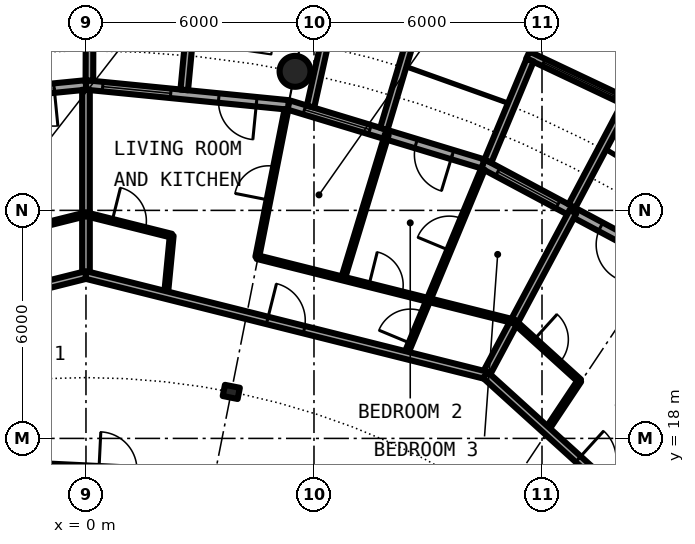
"""IFC4 building model, lengths in metres.
Left out: names, types, materials, properties, quantities, classifications, styles, units other than length and angle.
Written with IfcOpenShell. Run it as: python <this file> out.ifc"""

import sys

from ifc_helpers import new_model, si_unit, direction, frame, frame_2d, origin, origin_2d, place, context, subcontext, project, spatial, rectangle, circle, hollow_circle, i_section, extrude, element, fill, save


model = new_model("IFC4")
c1 = context("Model", 3, precision=1e-05, world=origin(), true_north=direction((0.0, 1.0)))
c2 = subcontext(c1, "Body", "Model", "MODEL_VIEW")
j1 = project(units=[si_unit("LENGTHUNIT", "METRE"), si_unit("PLANEANGLEUNIT", "RADIAN")], contexts=[c1])
p1 = place(None, origin())
s1 = spatial("IfcSite", under=j1, at=p1, CompositionType="ELEMENT")
p2 = place(p1, origin())
s2 = spatial("IfcBuilding", under=s1, at=p2, CompositionType="ELEMENT")
p3 = place(p2, frame((0.0, 0.0, 190.2)))
s3 = spatial("IfcBuildingStorey", under=s2, at=p3, CompositionType="ELEMENT", Elevation=190.2)
p4 = place(p3, frame((5.501, 27.658, 0.0), z_axis=(0.0, 0.0, 1.0), x_axis=(1.0, 0.0, 0.0)))
e1 = element("IfcColumn", 1, at=p4, inside=s3, PredefinedType="COLUMN", context=c2, shape_type="SweptSolid", body=[
    extrude(hollow_circle(Radius=0.406, WallThickness=0.03, at=origin_2d()), origin(), (0.0, 0.0, 1.0), 3.05),
])
p5 = place(p3, frame((3.824, 19.223, 0.0), z_axis=(0.0, 0.0, 1.0), x_axis=(0.195090322016, 0.980785280403, 0.0)))
e2 = element("IfcColumn", 2, at=p5, inside=s3, PredefinedType="COLUMN", context=c2, shape_type="SweptSolid", body=[
    extrude(i_section(OverallWidth=0.3, OverallDepth=0.4, WebThickness=0.013, FlangeThickness=0.024, FilletRadius=0.027, at=origin_2d()), origin(), (0.0, 0.0, 1.0), 3.05),
])
p6 = place(p3, frame((15.167, 22.699, 0.0), z_axis=(0.0, 0.0, 1.0), x_axis=(-0.881915646801, 0.471407246368, 0.0)))
e3 = element("IfcWall", 3, at=p6, inside=s3, PredefinedType="SOLIDWALL", context=c2, shape_type="SweptSolid", body=[
    extrude(rectangle(XDim=5.352, YDim=0.25, at=frame_2d((2.676, 0.0))), origin(), (0.0, 0.0, 1.0), 2.7),
])
p7 = place(p6, frame((0.841, 0.0, 0.0)))
e4 = element("IfcOpeningElement", 4, at=p7, cuts=e3, PredefinedType="OPENING", context=c2, shape_type="SweptSolid", body=[
    extrude(rectangle(XDim=1.0, YDim=2.2, at=frame_2d((0.5, 1.1))), frame((0.0, 0.135, 0.0), z_axis=(0.0, -1.0, 0.0), x_axis=(1.0, 0.0, 0.0)), (0.0, 0.0, 1.0), 0.27),
])
p8 = place(p6, frame((3.111, 0.0, 0.3)))
e5 = element("IfcOpeningElement", 5, at=p8, cuts=e3, PredefinedType="OPENING", context=c2, shape_type="SweptSolid", body=[
    extrude(rectangle(XDim=1.8, YDim=2.1, at=frame_2d((0.9, 1.05))), frame((0.0, 0.135, 0.0), z_axis=(0.0, -1.0, 0.0), x_axis=(1.0, 0.0, 0.0)), (0.0, 0.0, 1.0), 0.27),
])
p9 = place(p3, frame((14.335, 26.808, -0.03), z_axis=(0.0, 0.0, 1.0), x_axis=(-0.904000060331, 0.427532327342, 0.0)))
e6 = element("IfcWall", 6, at=p9, inside=s3, PredefinedType="SOLIDWALL", context=c2, shape_type="SweptSolid", body=[
    extrude(rectangle(XDim=2.993, YDim=0.2, at=frame_2d((1.497, 0.0))), origin(), (0.0, 0.0, 1.0), 2.73),
])
p10 = place(p9, frame((0.457, 0.0, 0.33)))
e7 = element("IfcOpeningElement", 7, at=p10, cuts=e6, PredefinedType="OPENING", context=c2, shape_type="SweptSolid", body=[
    extrude(circle(Radius=1.04, at=frame_2d((1.04, 1.04))), frame((0.0, 0.11, 0.0), z_axis=(0.0, -1.0, 0.0), x_axis=(1.0, 0.0, 0.0)), (0.0, 0.0, 1.0), 0.22),
])
p11 = place(p3, frame((12.787, 24.113, -0.03), z_axis=(0.0, 0.0, 1.0), x_axis=(0.468365282436, 0.883534924159, 0.0)))
e8 = element("IfcWall", 8, at=p11, inside=s3, PredefinedType="SOLIDWALL", context=c2, shape_type="SweptSolid", body=[
    extrude(rectangle(XDim=3.006, YDim=0.2, at=frame_2d((1.503, 0.0))), origin(), (0.0, 0.0, 1.0), 2.73),
])
p12 = place(p3, frame((10.575, 25.295, -0.03), z_axis=(0.0, 0.0, 1.0), x_axis=(0.385697364644, 0.922625353492, 0.0)))
e9 = element("IfcWall", 9, at=p12, inside=s3, PredefinedType="SOLIDWALL", context=c2, shape_type="SweptSolid", body=[
    extrude(rectangle(XDim=2.883, YDim=0.2, at=frame_2d((1.442, 0.0))), origin(), (0.0, 0.0, 1.0), 2.73),
])
p13 = place(p3, frame((10.447, 25.222, 0.0), z_axis=(0.0, 0.0, 1.0), x_axis=(-0.956965678721, 0.290201119486, 0.0)))
e10 = element("IfcWall", 10, at=p13, inside=s3, PredefinedType="SOLIDWALL", context=c2, shape_type="SweptSolid", body=[
    extrude(rectangle(XDim=5.351, YDim=0.25, at=frame_2d((2.676, 0.0))), origin(), (0.0, 0.0, 1.0), 2.7),
])
p14 = place(p13, frame((0.841, 0.0, 0.0)))
e11 = element("IfcOpeningElement", 11, at=p14, cuts=e10, PredefinedType="OPENING", context=c2, shape_type="SweptSolid", body=[
    extrude(rectangle(XDim=1.0, YDim=2.2, at=frame_2d((0.5, 1.1))), frame((0.0, 0.135, 0.0), z_axis=(0.0, -1.0, 0.0), x_axis=(1.0, 0.0, 0.0)), (0.0, 0.0, 1.0), 0.27),
])
p15 = place(p13, frame((3.111, 0.0, 0.3)))
e12 = element("IfcOpeningElement", 12, at=p15, cuts=e10, PredefinedType="OPENING", context=c2, shape_type="SweptSolid", body=[
    extrude(rectangle(XDim=1.8, YDim=2.1, at=frame_2d((0.9, 1.05))), frame((0.0, 0.135, 0.0), z_axis=(0.0, -1.0, 0.0), x_axis=(1.0, 0.0, 0.0)), (0.0, 0.0, 1.0), 0.27),
])
p16 = place(p3, frame((7.837, 26.144, -0.03), z_axis=(0.0, 0.0, 1.0), x_axis=(0.287064767992, 0.957911174889, 0.0)))
e13 = element("IfcWall", 13, at=p16, inside=s3, PredefinedType="SOLIDWALL", context=c2, shape_type="SweptSolid", body=[
    extrude(rectangle(XDim=3.006, YDim=0.2, at=frame_2d((1.503, 0.0))), origin(), (0.0, 0.0, 1.0), 2.73),
])
p17 = place(p3, frame((5.909, 26.729, -0.03), z_axis=(0.0, 0.0, 1.0), x_axis=(0.216409053917, 0.976302781612, 0.0)))
e14 = element("IfcWall", 14, at=p17, inside=s3, PredefinedType="SOLIDWALL", context=c2, shape_type="SweptSolid", body=[
    extrude(rectangle(XDim=2.925, YDim=0.2, at=frame_2d((1.463, 0.0))), origin(), (0.0, 0.0, 1.0), 2.73),
])
p18 = place(p3, frame((5.326, 26.775, 0.0), z_axis=(0.0, 0.0, 1.0), x_axis=(-0.995173996315, 0.098126026407, 0.0)))
e15 = element("IfcWall", 15, at=p18, inside=s3, PredefinedType="SOLIDWALL", context=c2, shape_type="SweptSolid", body=[
    extrude(rectangle(XDim=5.352, YDim=0.25, at=frame_2d((2.676, 0.0))), origin(), (0.0, 0.0, 1.0), 2.7),
])
p19 = place(p18, frame((0.841, 0.0, 0.0)))
e16 = element("IfcOpeningElement", 16, at=p19, cuts=e15, PredefinedType="OPENING", context=c2, shape_type="SweptSolid", body=[
    extrude(rectangle(XDim=1.0, YDim=2.2, at=frame_2d((0.5, 1.1))), frame((0.0, 0.135, 0.0), z_axis=(0.0, -1.0, 0.0), x_axis=(1.0, 0.0, 0.0)), (0.0, 0.0, 1.0), 0.27),
])
p20 = place(p18, frame((3.111, 0.0, 0.3)))
e17 = element("IfcOpeningElement", 17, at=p20, cuts=e15, PredefinedType="OPENING", context=c2, shape_type="SweptSolid", body=[
    extrude(rectangle(XDim=1.8, YDim=2.1, at=frame_2d((0.9, 1.05))), frame((0.0, 0.135, 0.0), z_axis=(0.0, -1.0, 0.0), x_axis=(1.0, 0.0, 0.0)), (0.0, 0.0, 1.0), 0.27),
])
p21 = place(p3, frame((2.586, 27.171, -0.03), z_axis=(0.0, 0.0, 1.0), x_axis=(0.094548432284, 0.995520262954, 0.0)))
e18 = element("IfcWall", 18, at=p21, inside=s3, PredefinedType="SOLIDWALL", context=c2, shape_type="SweptSolid", body=[
    extrude(rectangle(XDim=3.006, YDim=0.2, at=frame_2d((1.503, 0.0))), origin(), (0.0, 0.0, 1.0), 2.73),
])
p22 = place(p3, frame((0.09, 27.417, -0.03), z_axis=(0.0, 0.0, 1.0), x_axis=(0.00347308367, 0.999993968827, 0.0)))
e19 = element("IfcWall", 19, at=p22, inside=s3, PredefinedType="SOLIDWALL", context=c2, shape_type="SweptSolid", body=[
    extrude(rectangle(XDim=2.882, YDim=0.2, at=frame_2d((1.441, 0.0))), origin(), (0.0, 0.0, 1.0), 2.73),
])
p23 = place(p3, frame((0.0, 27.3, 0.0), z_axis=(0.0, 0.0, 1.0), x_axis=(-0.995173996315, -0.098126026407, 0.0)))
e20 = element("IfcWall", 20, at=p23, inside=s3, PredefinedType="SOLIDWALL", context=c2, shape_type="SweptSolid", body=[
    extrude(rectangle(XDim=5.352, YDim=0.25, at=frame_2d((2.676, 0.0))), origin(), (0.0, 0.0, 1.0), 2.7),
])
p24 = place(p23, frame((0.841, 0.0, 0.0)))
e21 = element("IfcOpeningElement", 21, at=p24, cuts=e20, PredefinedType="OPENING", context=c2, shape_type="SweptSolid", body=[
    extrude(rectangle(XDim=1.0, YDim=2.2, at=frame_2d((0.5, 1.1))), frame((0.0, 0.135, 0.0), z_axis=(0.0, -1.0, 0.0), x_axis=(1.0, 0.0, 0.0)), (0.0, 0.0, 1.0), 0.27),
])
p25 = place(p23, frame((3.111, 0.0, 0.3)))
e22 = element("IfcOpeningElement", 22, at=p25, cuts=e20, PredefinedType="OPENING", context=c2, shape_type="SweptSolid", body=[
    extrude(rectangle(XDim=1.8, YDim=2.1, at=frame_2d((0.9, 1.05))), frame((0.0, 0.135, 0.0), z_axis=(0.0, -1.0, 0.0), x_axis=(1.0, 0.0, 0.0)), (0.0, 0.0, 1.0), 0.27),
])
p26 = place(p3, frame((8.41, 20.193, 0.0), z_axis=(0.0, 0.0, 1.0), x_axis=(0.38420646001, 0.923247202046, 0.0)))
e23 = element("IfcWall", 23, at=p26, inside=s3, PredefinedType="PARTITIONING", context=c2, shape_type="SweptSolid", body=[
    extrude(rectangle(XDim=5.3, YDim=0.1, at=frame_2d((2.65, 0.0))), origin(), (0.0, 0.0, 1.0), 2.7),
])
p27 = place(p26, frame((0.335, 0.0, 0.0)))
e24 = element("IfcOpeningElement", 24, at=p27, cuts=e23, PredefinedType="OPENING", context=c2, shape_type="SweptSolid", body=[
    extrude(rectangle(XDim=0.9, YDim=2.3, at=frame_2d((0.45, 1.15))), frame((0.0, 0.06, 0.0), z_axis=(0.0, -1.0, 0.0), x_axis=(1.0, 0.0, 0.0)), (0.0, 0.0, 1.0), 0.12),
])
p28 = place(p26, frame((2.985, 0.0, 0.0)))
e25 = element("IfcOpeningElement", 25, at=p28, cuts=e23, PredefinedType="OPENING", context=c2, shape_type="SweptSolid", body=[
    extrude(rectangle(XDim=0.9, YDim=2.3, at=frame_2d((0.45, 1.15))), frame((0.0, 0.06, 0.0), z_axis=(0.0, -1.0, 0.0), x_axis=(1.0, 0.0, 0.0)), (0.0, 0.0, 1.0), 0.12),
])
p29 = place(p3, frame((0.0, 22.3, 0.0), z_axis=(0.0, 0.0, 1.0), x_axis=(0.0, 1.0, 0.0)))
e26 = element("IfcWall", 26, at=p29, inside=s3, PredefinedType="PARTITIONING", context=c2, shape_type="SweptSolid", body=[
    extrude(rectangle(XDim=4.875, YDim=0.2, at=frame_2d((2.438, 0.0))), origin(), (0.0, 0.0, 1.0), 2.7),
])
p30 = place(p3, frame((2.105, 21.773, 0.0), z_axis=(0.0, 0.0, 1.0), x_axis=(0.096239724492, 0.995358184489, 0.0)))
e27 = element("IfcWall", 27, at=p30, inside=s3, PredefinedType="PARTITIONING", context=c2, shape_type="SweptSolid", body=[
    extrude(rectangle(XDim=1.57, YDim=0.1, at=frame_2d((0.785, 0.0))), origin(), (0.0, 0.0, 1.0), 2.7),
])
p31 = place(p3, frame((4.507, 22.771, 0.0), z_axis=(0.0, 0.0, 1.0), x_axis=(0.194030211642, 0.980995554001, 0.0)))
e28 = element("IfcWall", 28, at=p31, inside=s3, PredefinedType="PARTITIONING", context=c2, shape_type="SweptSolid", body=[
    extrude(rectangle(XDim=3.962, YDim=0.1, at=frame_2d((1.981, 0.0))), origin(), (0.0, 0.0, 1.0), 2.7),
])
p32 = place(p31, frame((1.531, 0.0, 0.0)))
e29 = element("IfcOpeningElement", 29, at=p32, cuts=e28, PredefinedType="OPENING", context=c2, shape_type="SweptSolid", body=[
    extrude(rectangle(XDim=0.9, YDim=2.3, at=frame_2d((0.45, 1.15))), frame((0.0, 0.06, 0.0), z_axis=(0.0, -1.0, 0.0), x_axis=(1.0, 0.0, 0.0)), (0.0, 0.0, 1.0), 0.12),
])
p33 = place(p3, frame((6.763, 22.206, 0.0), z_axis=(0.0, 0.0, 1.0), x_axis=(0.291291575636, 0.956634317785, 0.0)))
e30 = element("IfcWall", 30, at=p33, inside=s3, PredefinedType="PARTITIONING", context=c2, shape_type="SweptSolid", body=[
    extrude(rectangle(XDim=3.962, YDim=0.1, at=frame_2d((1.981, 0.0))), origin(), (0.0, 0.0, 1.0), 2.7),
])
p34 = place(p3, frame((10.516, 19.665, 0.0), z_axis=(0.0, 0.0, 1.0), x_axis=(0.471388689095, 0.881925565903, 0.0)))
e31 = element("IfcWall", 31, at=p34, inside=s3, PredefinedType="PARTITIONING", context=c2, shape_type="SweptSolid", body=[
    extrude(rectangle(XDim=4.875, YDim=0.2, at=frame_2d((2.438, 0.0))), origin(), (0.0, 0.0, 1.0), 2.7),
])
p35 = place(p3, frame((12.118, 18.211, 0.0), z_axis=(0.0, 0.0, 1.0), x_axis=(0.554125989098, 0.832432813028, 0.0)))
e32 = element("IfcWall", 32, at=p35, inside=s3, PredefinedType="PARTITIONING", context=c2, shape_type="SweptSolid", body=[
    extrude(rectangle(XDim=1.57, YDim=0.1, at=frame_2d((0.785, 0.0))), origin(), (0.0, 0.0, 1.0), 2.7),
])
p36 = place(p3, frame((-3.458, 17.359, 0.0), z_axis=(0.0, 0.0, 1.0), x_axis=(0.998807562286, -0.048820625966, 0.0)))
e33 = element("IfcWall", 33, at=p36, inside=s3, PredefinedType="PARTITIONING", context=c2, shape_type="SweptSolid", body=[
    extrude(rectangle(XDim=8.601, YDim=0.2, at=frame_2d((4.301, 0.0))), origin(), (0.0, 0.0, 1.0), 2.7),
])
p37 = place(p36, frame((3.804, 0.0, 0.0)))
e34 = element("IfcOpeningElement", 34, at=p37, cuts=e33, PredefinedType="OPENING", context=c2, shape_type="SweptSolid", body=[
    extrude(rectangle(XDim=1.0, YDim=2.3, at=frame_2d((0.5, 1.15))), frame((0.0, 0.11, 0.0), z_axis=(0.0, -1.0, 0.0), x_axis=(1.0, 0.0, 0.0)), (0.0, 0.0, 1.0), 0.22),
])
p38 = place(p3, frame((-10.521, 19.662, 0.0), z_axis=(0.0, 0.0, 1.0), x_axis=(0.969975443945, 0.243202874456, 0.0)))
e35 = element("IfcWall", 35, at=p38, inside=s3, PredefinedType="PARTITIONING", context=c2, shape_type="SweptSolid", body=[
    extrude(rectangle(XDim=10.847, YDim=0.2, at=frame_2d((5.423, 0.0))), origin(), (0.0, 0.0, 1.0), 2.7),
])
p39 = place(p38, frame((4.928, 0.0, 0.0)))
e36 = element("IfcOpeningElement", 36, at=p39, cuts=e35, PredefinedType="OPENING", context=c2, shape_type="SweptSolid", body=[
    extrude(rectangle(XDim=1.0, YDim=2.3, at=frame_2d((0.5, 1.15))), frame((0.0, 0.11, 0.0), z_axis=(0.0, -1.0, 0.0), x_axis=(1.0, 0.0, 0.0)), (0.0, 0.0, 1.0), 0.22),
])
p40 = place(p3, frame((0.0, 22.3, 0.0), z_axis=(0.0, 0.0, 1.0), x_axis=(0.969975443945, -0.243202874456, 0.0)))
e37 = element("IfcWall", 37, at=p40, inside=s3, PredefinedType="PARTITIONING", context=c2, shape_type="SweptSolid", body=[
    extrude(rectangle(XDim=10.847, YDim=0.2, at=frame_2d((5.423, 0.0))), origin(), (0.0, 0.0, 1.0), 2.7),
])
p41 = place(p40, frame((4.918, 0.0, 0.0)))
e38 = element("IfcOpeningElement", 38, at=p41, cuts=e37, PredefinedType="OPENING", context=c2, shape_type="SweptSolid", body=[
    extrude(rectangle(XDim=1.0, YDim=2.3, at=frame_2d((0.5, 1.15))), frame((0.0, 0.11, 0.0), z_axis=(0.0, -1.0, 0.0), x_axis=(1.0, 0.0, 0.0)), (0.0, 0.0, 1.0), 0.22),
])
p42 = place(p3, frame((10.512, 19.667, 0.0), z_axis=(0.0, 0.0, 1.0), x_axis=(0.740853508928, -0.671666642248, 0.0)))
e39 = element("IfcWall", 39, at=p42, inside=s3, PredefinedType="PARTITIONING", context=c2, shape_type="SweptSolid", body=[
    extrude(rectangle(XDim=10.84, YDim=0.2, at=frame_2d((5.42, 0.0))), origin(), (0.0, 0.0, 1.0), 2.7),
])
p43 = place(p42, frame((3.293, 0.0, 0.0)))
e40 = element("IfcOpeningElement", 40, at=p43, cuts=e39, PredefinedType="OPENING", context=c2, shape_type="SweptSolid", body=[
    extrude(rectangle(XDim=1.0, YDim=2.3, at=frame_2d((0.5, 1.15))), frame((0.0, 0.11, 0.0), z_axis=(0.0, -1.0, 0.0), x_axis=(1.0, 0.0, 0.0)), (0.0, 0.0, 1.0), 0.22),
])
p44 = place(p3, frame((-6.76, 22.206, 0.0), z_axis=(0.0, 0.0, 1.0), x_axis=(0.9700785795, 0.242791164576, 0.0)))
e41 = element("IfcWall", 41, at=p44, inside=s3, PredefinedType="PARTITIONING", context=c2, shape_type="SweptSolid", body=[
    extrude(rectangle(XDim=6.969, YDim=0.1, at=frame_2d((3.484, 0.0))), origin(), (0.0, 0.0, 1.0), 2.7),
])
p45 = place(p44, frame((3.036, 0.0, 0.0)))
e42 = element("IfcOpeningElement", 42, at=p45, cuts=e41, PredefinedType="OPENING", context=c2, shape_type="SweptSolid", body=[
    extrude(rectangle(XDim=0.9, YDim=2.3, at=frame_2d((0.45, 1.15))), frame((0.0, 0.06, 0.0), z_axis=(0.0, -1.0, 0.0), x_axis=(1.0, 0.0, 0.0)), (0.0, 0.0, 1.0), 0.12),
])
p46 = place(p3, frame((0.0, 23.898, 0.0), z_axis=(0.0, 0.0, 1.0), x_axis=(0.970068250789, -0.242832429489, 0.0)))
e43 = element("IfcWall", 43, at=p46, inside=s3, PredefinedType="PARTITIONING", context=c2, shape_type="SweptSolid", body=[
    extrude(rectangle(XDim=2.323, YDim=0.1, at=frame_2d((1.161, 0.0))), origin(), (0.0, 0.0, 1.0), 2.7),
])
p47 = place(p46, frame((0.711, 0.0, 0.0)))
e44 = element("IfcOpeningElement", 44, at=p47, cuts=e43, PredefinedType="OPENING", context=c2, shape_type="SweptSolid", body=[
    extrude(rectangle(XDim=0.9, YDim=2.3, at=frame_2d((0.45, 1.15))), frame((0.0, 0.06, 0.0), z_axis=(0.0, -1.0, 0.0), x_axis=(1.0, 0.0, 0.0)), (0.0, 0.0, 1.0), 0.12),
])
p48 = place(p3, frame((4.502, 22.771, 0.0), z_axis=(0.0, 0.0, 1.0), x_axis=(0.970072433546, -0.242815719578, 0.0)))
e45 = element("IfcWall", 45, at=p48, inside=s3, PredefinedType="PARTITIONING", context=c2, shape_type="SweptSolid", body=[
    extrude(rectangle(XDim=6.973, YDim=0.1, at=frame_2d((3.486, 0.0))), origin(), (0.0, 0.0, 1.0), 2.7),
])
p49 = place(p48, frame((3.036, 0.0, 0.0)))
e46 = element("IfcOpeningElement", 46, at=p49, cuts=e45, PredefinedType="OPENING", context=c2, shape_type="SweptSolid", body=[
    extrude(rectangle(XDim=0.9, YDim=2.3, at=frame_2d((0.45, 1.15))), frame((0.0, 0.06, 0.0), z_axis=(0.0, -1.0, 0.0), x_axis=(1.0, 0.0, 0.0)), (0.0, 0.0, 1.0), 0.12),
])
p50 = place(p3, frame((11.271, 21.074, 0.0), z_axis=(0.0, 0.0, 1.0), x_axis=(0.74087097024, -0.671647381783, 0.0)))
e47 = element("IfcWall", 47, at=p50, inside=s3, PredefinedType="PARTITIONING", context=c2, shape_type="SweptSolid", body=[
    extrude(rectangle(XDim=2.324, YDim=0.1, at=frame_2d((1.162, 0.0))), origin(), (0.0, 0.0, 1.0), 2.7),
])
p51 = place(p50, frame((0.705, 0.0, 0.0)))
e48 = element("IfcOpeningElement", 48, at=p51, cuts=e47, PredefinedType="OPENING", context=c2, shape_type="SweptSolid", body=[
    extrude(rectangle(XDim=0.9, YDim=2.3, at=frame_2d((0.45, 1.15))), frame((0.0, 0.06, 0.0), z_axis=(0.0, -1.0, 0.0), x_axis=(1.0, 0.0, 0.0)), (0.0, 0.0, 1.0), 0.12),
])
p52 = place(p7, origin())
e49 = element("IfcDoor", 49, at=p52, inside=s3, OperationType="SINGLE_SWING_LEFT", PredefinedType="DOOR", context=c2, shape_type="SweptSolid", body=[
    extrude(rectangle(XDim=1.0, YDim=2.2, at=frame_2d((0.5, 1.1))), frame((0.0, 0.025, 0.0), z_axis=(0.0, -1.0, 0.0), x_axis=(1.0, 0.0, 0.0)), (0.0, 0.0, 1.0), 0.05),
])
fill(e4, e49)
p53 = place(p8, origin())
e50 = element("IfcWindow", 50, at=p53, inside=s3, PartitioningType="SINGLE_PANEL", PredefinedType="WINDOW", context=c2, shape_type="SweptSolid", body=[
    extrude(rectangle(XDim=1.8, YDim=2.1, at=frame_2d((0.9, 1.05))), frame((0.0, 0.03, 0.0), z_axis=(0.0, -1.0, 0.0), x_axis=(1.0, 0.0, 0.0)), (0.0, 0.0, 1.0), 0.06),
])
fill(e5, e50)
p54 = place(p10, origin())
e51 = element("IfcWindow", 51, at=p54, inside=s3, PartitioningType="SINGLE_PANEL", PredefinedType="WINDOW", context=c2, shape_type="SweptSolid", body=[
    extrude(circle(Radius=1.04, at=frame_2d((1.04, 1.04))), frame((0.0, 0.03, 0.0), z_axis=(0.0, -1.0, 0.0), x_axis=(1.0, 0.0, 0.0)), (0.0, 0.0, 1.0), 0.06),
])
fill(e7, e51)
p55 = place(p14, origin())
e52 = element("IfcDoor", 52, at=p55, inside=s3, OperationType="SINGLE_SWING_LEFT", PredefinedType="DOOR", context=c2, shape_type="SweptSolid", body=[
    extrude(rectangle(XDim=1.0, YDim=2.2, at=frame_2d((0.5, 1.1))), frame((0.0, 0.025, 0.0), z_axis=(0.0, -1.0, 0.0), x_axis=(1.0, 0.0, 0.0)), (0.0, 0.0, 1.0), 0.05),
])
fill(e11, e52)
p56 = place(p15, origin())
e53 = element("IfcWindow", 53, at=p56, inside=s3, PartitioningType="SINGLE_PANEL", PredefinedType="WINDOW", context=c2, shape_type="SweptSolid", body=[
    extrude(rectangle(XDim=1.8, YDim=2.1, at=frame_2d((0.9, 1.05))), frame((0.0, 0.03, 0.0), z_axis=(0.0, -1.0, 0.0), x_axis=(1.0, 0.0, 0.0)), (0.0, 0.0, 1.0), 0.06),
])
fill(e12, e53)
p57 = place(p19, origin())
e54 = element("IfcDoor", 54, at=p57, inside=s3, OperationType="SINGLE_SWING_LEFT", PredefinedType="DOOR", context=c2, shape_type="SweptSolid", body=[
    extrude(rectangle(XDim=1.0, YDim=2.2, at=frame_2d((0.5, 1.1))), frame((0.0, 0.025, 0.0), z_axis=(0.0, -1.0, 0.0), x_axis=(1.0, 0.0, 0.0)), (0.0, 0.0, 1.0), 0.05),
])
fill(e16, e54)
p58 = place(p20, origin())
e55 = element("IfcWindow", 55, at=p58, inside=s3, PartitioningType="SINGLE_PANEL", PredefinedType="WINDOW", context=c2, shape_type="SweptSolid", body=[
    extrude(rectangle(XDim=1.8, YDim=2.1, at=frame_2d((0.9, 1.05))), frame((0.0, 0.03, 0.0), z_axis=(0.0, -1.0, 0.0), x_axis=(1.0, 0.0, 0.0)), (0.0, 0.0, 1.0), 0.06),
])
fill(e17, e55)
p59 = place(p24, origin())
e56 = element("IfcDoor", 56, at=p59, inside=s3, OperationType="SINGLE_SWING_LEFT", PredefinedType="DOOR", context=c2, shape_type="SweptSolid", body=[
    extrude(rectangle(XDim=1.0, YDim=2.2, at=frame_2d((0.5, 1.1))), frame((0.0, 0.025, 0.0), z_axis=(0.0, -1.0, 0.0), x_axis=(1.0, 0.0, 0.0)), (0.0, 0.0, 1.0), 0.05),
])
fill(e21, e56)
p60 = place(p43, origin())
e57 = element("IfcDoor", 57, at=p60, inside=s3, OperationType="SINGLE_SWING_LEFT", PredefinedType="DOOR", context=c2, shape_type="SweptSolid", body=[
    extrude(rectangle(XDim=1.0, YDim=2.3, at=frame_2d((0.5, 1.15))), frame((0.0, 0.025, 0.0), z_axis=(0.0, -1.0, 0.0), x_axis=(1.0, 0.0, 0.0)), (0.0, 0.0, 1.0), 0.05),
])
fill(e40, e57)
p61 = place(p51, origin())
e58 = element("IfcDoor", 58, at=p61, inside=s3, OperationType="SINGLE_SWING_LEFT", PredefinedType="DOOR", context=c2, shape_type="SweptSolid", body=[
    extrude(rectangle(XDim=0.9, YDim=2.3, at=frame_2d((0.45, 1.15))), frame((0.0, 0.025, 0.0), z_axis=(0.0, -1.0, 0.0), x_axis=(1.0, 0.0, 0.0)), (0.0, 0.0, 1.0), 0.05),
])
fill(e48, e58)
p62 = place(p41, origin())
e59 = element("IfcDoor", 59, at=p62, inside=s3, OperationType="SINGLE_SWING_LEFT", PredefinedType="DOOR", context=c2, shape_type="SweptSolid", body=[
    extrude(rectangle(XDim=1.0, YDim=2.3, at=frame_2d((0.5, 1.15))), frame((0.0, 0.025, 0.0), z_axis=(0.0, -1.0, 0.0), x_axis=(1.0, 0.0, 0.0)), (0.0, 0.0, 1.0), 0.05),
])
fill(e38, e59)
p63 = place(p47, origin())
e60 = element("IfcDoor", 60, at=p63, inside=s3, OperationType="SINGLE_SWING_LEFT", PredefinedType="DOOR", context=c2, shape_type="SweptSolid", body=[
    extrude(rectangle(XDim=0.9, YDim=2.3, at=frame_2d((0.45, 1.15))), frame((0.0, 0.025, 0.0), z_axis=(0.0, -1.0, 0.0), x_axis=(1.0, 0.0, 0.0)), (0.0, 0.0, 1.0), 0.05),
])
fill(e44, e60)
p64 = place(p27, origin())
e61 = element("IfcDoor", 61, at=p64, inside=s3, OperationType="SINGLE_SWING_LEFT", PredefinedType="DOOR", context=c2, shape_type="SweptSolid", body=[
    extrude(rectangle(XDim=0.9, YDim=2.3, at=frame_2d((0.45, 1.15))), frame((0.0, 0.025, 0.0), z_axis=(0.0, -1.0, 0.0), x_axis=(1.0, 0.0, 0.0)), (0.0, 0.0, 1.0), 0.05),
])
fill(e24, e61)
p65 = place(p32, origin())
e62 = element("IfcDoor", 62, at=p65, inside=s3, OperationType="SINGLE_SWING_RIGHT", PredefinedType="DOOR", context=c2, shape_type="SweptSolid", body=[
    extrude(rectangle(XDim=0.9, YDim=2.3, at=frame_2d((0.45, 1.15))), frame((0.0, 0.025, 0.0), z_axis=(0.0, -1.0, 0.0), x_axis=(1.0, 0.0, 0.0)), (0.0, 0.0, 1.0), 0.05),
])
fill(e29, e62)
p66 = place(p49, origin())
e63 = element("IfcDoor", 63, at=p66, inside=s3, OperationType="SINGLE_SWING_RIGHT", PredefinedType="DOOR", context=c2, shape_type="SweptSolid", body=[
    extrude(rectangle(XDim=0.9, YDim=2.3, at=frame_2d((0.45, 1.15))), frame((0.0, 0.025, 0.0), z_axis=(0.0, -1.0, 0.0), x_axis=(1.0, 0.0, 0.0)), (0.0, 0.0, 1.0), 0.05),
])
fill(e46, e63)
p67 = place(p28, origin())
e64 = element("IfcDoor", 64, at=p67, inside=s3, OperationType="SINGLE_SWING_RIGHT", PredefinedType="DOOR", context=c2, shape_type="SweptSolid", body=[
    extrude(rectangle(XDim=0.9, YDim=2.3, at=frame_2d((0.45, 1.15))), frame((0.0, 0.025, 0.0), z_axis=(0.0, -1.0, 0.0), x_axis=(1.0, 0.0, 0.0)), (0.0, 0.0, 1.0), 0.05),
])
fill(e25, e64)
save(model, sys.argv[1])
